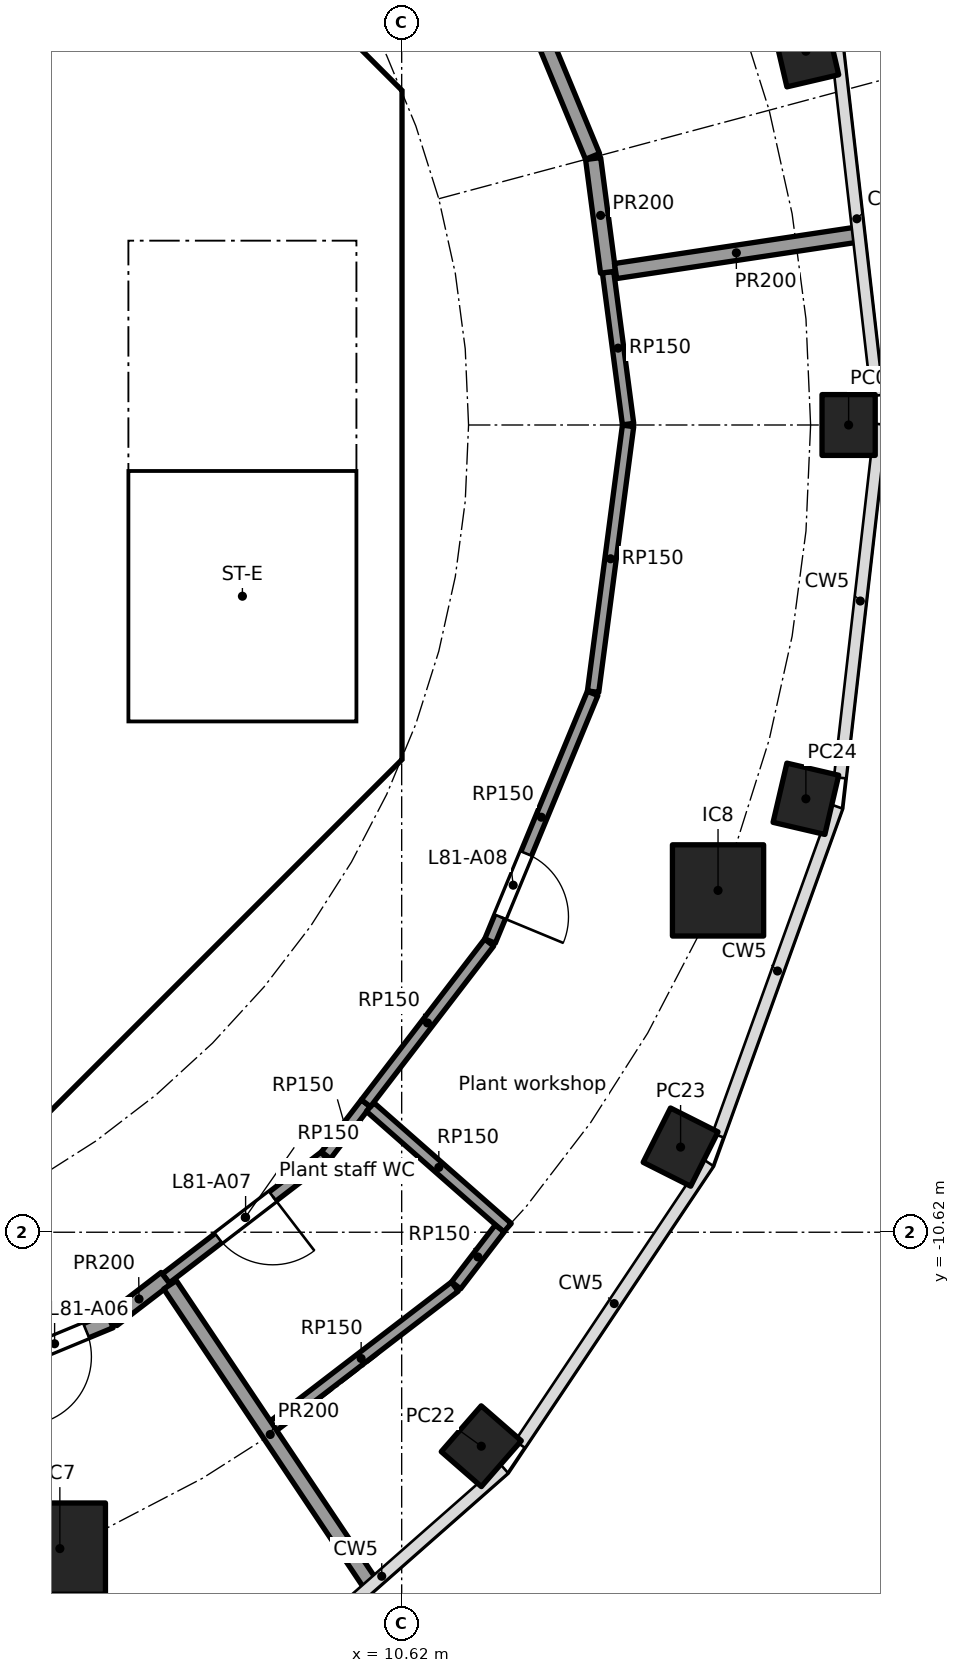
"""IFC4 building model, lengths in metres.
Left out: names, types, materials, properties, quantities, classifications, styles, units other than length and angle.
Written with IfcOpenShell. Run it as: python <this file> out.ifc"""

import sys

from ifc_helpers import new_model, si_unit, direction, frame, frame_2d, origin, origin_2d, place, context, subcontext, project, spatial, polyline, rectangle, hollow_rectangle, outline, extrude, element, fill, save


model = new_model("IFC4")
c1 = context("Model", 3, precision=1e-05, world=origin(), true_north=direction((0.0, 1.0)))
c2 = subcontext(c1, "Body", "Model", "MODEL_VIEW")
j1 = project(units=[si_unit("LENGTHUNIT", "METRE"), si_unit("PLANEANGLEUNIT", "RADIAN")], contexts=[c1])
p1 = place(None, origin())
s1 = spatial("IfcSite", under=j1, at=p1, CompositionType="ELEMENT")
p2 = place(p1, origin())
s2 = spatial("IfcBuilding", under=s1, at=p2, CompositionType="ELEMENT")
p3 = place(p2, frame((0.0, 0.0, 328.9)))
s3 = spatial("IfcBuildingStorey", under=s2, at=p3, CompositionType="ELEMENT", Elevation=328.9)
for number, where, z_axis, x_axis in (
    (1, (16.5, 0.0, 0.0), (0.0, 0.0, 1.0), (0.0, 1.0, 0.0)),
    (2, (15.938, 4.917, 0.0), (0.0, 0.0, 1.0), (-0.227, 0.974, 0.0)),
    (3, (11.667, -13.435, 0.0), (0.0, 0.0, 1.0), (0.657, 0.754, 0.0)),
    (4, (14.289, -9.5, 0.0), (0.0, 0.0, 1.0), (0.45, 0.893, 0.0)),
    (5, (15.938, -4.917, 0.0), (0.0, 0.0, 1.0), (0.227, 0.974, 0.0)),
):
    element("IfcColumn", number, at=place(p3, frame(where, z_axis=z_axis, x_axis=x_axis)), inside=s3, PredefinedType="COLUMN", context=c2, shape_type="SweptSolid", body=[
        extrude(hollow_rectangle(XDim=0.8, YDim=0.7, WallThickness=0.025, at=origin_2d()), origin(), (0.0, 0.0, 1.0), 4.0),
    ])
for number, where, z_axis, x_axis in (
    (6, (6.123, -14.782, 0.0), (0.0, 0.0, 1.0), (1.0, 0.0, 0.0)),
    (7, (14.782, -6.123, 0.0), (0.0, 0.0, 1.0), (1.0, 0.0, 0.0)),
):
    element("IfcColumn", number, at=place(p3, frame(where, z_axis=z_axis, x_axis=x_axis)), inside=s3, PredefinedType="COLUMN", context=c2, shape_type="SweptSolid", body=[
        extrude(rectangle(XDim=1.2, YDim=1.2, at=origin_2d()), origin(), (0.0, 0.0, 1.0), 4.0),
    ])
p4 = place(p3, frame((9.988, 4.613, 0.0), z_axis=(0.0, 0.0, 1.0), x_axis=(-0.707106781187, 0.707106781187, 0.0)))
e8 = element("IfcWall", 8, at=p4, inside=s3, PredefinedType="SHEAR", context=c2, shape_type="SweptSolid", body=[
    extrude(rectangle(XDim=7.602, YDim=0.6, at=frame_2d((3.801, 0.0))), origin(), (0.0, 0.0, 1.0), 3.7),
])
p5 = place(p4, frame((3.201, 0.0, 0.0)))
e9 = element("IfcOpeningElement", 9, at=p5, cuts=e8, PredefinedType="OPENING", context=c2, shape_type="SweptSolid", body=[
    extrude(rectangle(XDim=1.2, YDim=2.1, at=frame_2d((0.6, 1.05))), frame((0.0, 0.31, 0.0), z_axis=(0.0, -1.0, 0.0), x_axis=(1.0, 0.0, 0.0)), (0.0, 0.0, 1.0), 0.62),
])
p6 = place(p3, frame((4.613, -9.988, 0.0), z_axis=(0.0, 0.0, 1.0), x_axis=(0.707106781187, 0.707106781187, 0.0)))
e10 = element("IfcWall", 10, at=p6, inside=s3, PredefinedType="SHEAR", context=c2, shape_type="SweptSolid", body=[
    extrude(rectangle(XDim=7.602, YDim=0.6, at=frame_2d((3.801, 0.0))), origin(), (0.0, 0.0, 1.0), 3.7),
])
p7 = place(p6, frame((3.201, 0.0, 0.0)))
e11 = element("IfcOpeningElement", 11, at=p7, cuts=e10, PredefinedType="OPENING", context=c2, shape_type="SweptSolid", body=[
    extrude(rectangle(XDim=1.2, YDim=2.1, at=frame_2d((0.6, 1.05))), frame((0.0, 0.31, 0.0), z_axis=(0.0, -1.0, 0.0), x_axis=(1.0, 0.0, 0.0)), (0.0, 0.0, 1.0), 0.62),
])
p8 = place(p3, frame((-6.7, 2.0, 0.0), z_axis=(0.0, 0.0, 1.0), x_axis=(1.0, 0.0, 0.0)))
e12 = element("IfcWall", 12, at=p8, inside=s3, PredefinedType="SOLIDWALL", context=c2, shape_type="SweptSolid", body=[
    extrude(rectangle(XDim=13.4, YDim=0.2, at=frame_2d((6.7, 0.0))), origin(), (0.0, 0.0, 1.0), 3.7),
])
p9 = place(p8, frame((1.85, 0.0, 0.0)))
e13 = element("IfcOpeningElement", 13, at=p9, cuts=e12, PredefinedType="OPENING", context=c2, shape_type="SweptSolid", body=[
    extrude(rectangle(XDim=0.9, YDim=2.1, at=frame_2d((0.45, 1.05))), frame((0.0, 0.11, 0.0), z_axis=(0.0, -1.0, 0.0), x_axis=(1.0, 0.0, 0.0)), (0.0, 0.0, 1.0), 0.22),
])
p10 = place(p8, frame((5.15, 0.0, 0.0)))
e14 = element("IfcOpeningElement", 14, at=p10, cuts=e12, PredefinedType="OPENING", context=c2, shape_type="SweptSolid", body=[
    extrude(rectangle(XDim=0.9, YDim=2.1, at=frame_2d((0.45, 1.05))), frame((0.0, 0.11, 0.0), z_axis=(0.0, -1.0, 0.0), x_axis=(1.0, 0.0, 0.0)), (0.0, 0.0, 1.0), 0.22),
])
p11 = place(p8, frame((8.45, 0.0, 0.0)))
e15 = element("IfcOpeningElement", 15, at=p11, cuts=e12, PredefinedType="OPENING", context=c2, shape_type="SweptSolid", body=[
    extrude(rectangle(XDim=0.9, YDim=2.1, at=frame_2d((0.45, 1.05))), frame((0.0, 0.11, 0.0), z_axis=(0.0, -1.0, 0.0), x_axis=(1.0, 0.0, 0.0)), (0.0, 0.0, 1.0), 0.22),
])
p12 = place(p8, frame((11.75, 0.0, 0.0)))
e16 = element("IfcOpeningElement", 16, at=p12, cuts=e12, PredefinedType="OPENING", context=c2, shape_type="SweptSolid", body=[
    extrude(rectangle(XDim=0.9, YDim=2.1, at=frame_2d((0.45, 1.05))), frame((0.0, 0.11, 0.0), z_axis=(0.0, -1.0, 0.0), x_axis=(1.0, 0.0, 0.0)), (0.0, 0.0, 1.0), 0.22),
])
p13 = place(p3, frame((6.7, 4.0, 0.0), z_axis=(0.0, 0.0, 1.0), x_axis=(1.0, 0.0, 0.0)))
e17 = element("IfcWall", 17, at=p13, inside=s3, PredefinedType="SOLIDWALL", context=c2, shape_type="SweptSolid", body=[
    extrude(rectangle(XDim=3.325, YDim=0.2, at=frame_2d((1.662, 0.0))), origin(), (0.0, 0.0, 1.0), 3.7),
])
p14 = place(p13, frame((1.25, 0.0, 0.0)))
e18 = element("IfcOpeningElement", 18, at=p14, cuts=e17, PredefinedType="OPENING", context=c2, shape_type="SweptSolid", body=[
    extrude(rectangle(XDim=1.1, YDim=2.1, at=frame_2d((0.55, 1.05))), frame((0.0, 0.11, 0.0), z_axis=(0.0, -1.0, 0.0), x_axis=(1.0, 0.0, 0.0)), (0.0, 0.0, 1.0), 0.22),
])
p15 = place(p3, frame((-6.7, -2.0, 0.0), z_axis=(0.0, 0.0, 1.0), x_axis=(1.0, 0.0, 0.0)))
e19 = element("IfcWall", 19, at=p15, inside=s3, PredefinedType="SOLIDWALL", context=c2, shape_type="SweptSolid", body=[
    extrude(rectangle(XDim=13.4, YDim=0.2, at=frame_2d((6.7, 0.0))), origin(), (0.0, 0.0, 1.0), 3.7),
])
p16 = place(p15, frame((1.85, 0.0, 0.0)))
e20 = element("IfcOpeningElement", 20, at=p16, cuts=e19, PredefinedType="OPENING", context=c2, shape_type="SweptSolid", body=[
    extrude(rectangle(XDim=0.9, YDim=2.1, at=frame_2d((0.45, 1.05))), frame((0.0, 0.11, 0.0), z_axis=(0.0, -1.0, 0.0), x_axis=(1.0, 0.0, 0.0)), (0.0, 0.0, 1.0), 0.22),
])
p17 = place(p15, frame((5.15, 0.0, 0.0)))
e21 = element("IfcOpeningElement", 21, at=p17, cuts=e19, PredefinedType="OPENING", context=c2, shape_type="SweptSolid", body=[
    extrude(rectangle(XDim=0.9, YDim=2.1, at=frame_2d((0.45, 1.05))), frame((0.0, 0.11, 0.0), z_axis=(0.0, -1.0, 0.0), x_axis=(1.0, 0.0, 0.0)), (0.0, 0.0, 1.0), 0.22),
])
p18 = place(p15, frame((7.35, 0.0, 0.0)))
e22 = element("IfcOpeningElement", 22, at=p18, cuts=e19, PredefinedType="OPENING", context=c2, shape_type="SweptSolid", body=[
    extrude(rectangle(XDim=0.9, YDim=2.1, at=frame_2d((0.45, 1.05))), frame((0.0, 0.11, 0.0), z_axis=(0.0, -1.0, 0.0), x_axis=(1.0, 0.0, 0.0)), (0.0, 0.0, 1.0), 0.22),
])
p19 = place(p15, frame((10.65, 0.0, 0.0)))
e23 = element("IfcOpeningElement", 23, at=p19, cuts=e19, PredefinedType="OPENING", context=c2, shape_type="SweptSolid", body=[
    extrude(rectangle(XDim=0.9, YDim=2.1, at=frame_2d((0.45, 1.05))), frame((0.0, 0.11, 0.0), z_axis=(0.0, -1.0, 0.0), x_axis=(1.0, 0.0, 0.0)), (0.0, 0.0, 1.0), 0.22),
])
p20 = place(p3, origin())
e24 = element("IfcWall", 24, at=p20, inside=s3, PredefinedType="SHEAR", context=c2, shape_type="SweptSolid", body=[
    extrude(outline(polyline([(9.776, -4.401), (10.025, -4.152), (10.025, -3.801), (10.025, 4.152), (9.776, 4.401), (10.2, 4.825), (10.625, 4.401), (10.625, -4.401), (10.2, -4.825), (9.776, -4.401)])), origin(), (0.0, 0.0, 1.0), 3.7),
])
p21 = place(p3, origin())
e25 = element("IfcWall", 25, at=p21, inside=s3, PredefinedType="SOLIDWALL", context=c2, shape_type="SweptSolid", body=[
    extrude(outline(polyline([(-6.7, -2.1), (-6.5, -2.1), (-6.5, -4.1), (-2.3, -4.1), (-2.3, -2.1), (-2.1, -2.1), (-2.1, -4.1), (-0.1, -4.1), (-0.1, -2.1), (0.1, -2.1), (0.1, -4.1), (2.1, -4.1), (2.1, -2.1), (2.3, -2.1), (2.3, -4.1), (6.5, -4.1), (6.5, -2.1), (6.7, -2.1), (6.7, -4.3), (-6.7, -4.3), (-6.7, -2.1)])), origin(), (0.0, 0.0, 1.0), 3.7),
])
p22 = place(p3, origin())
e26 = element("IfcWall", 26, at=p22, inside=s3, PredefinedType="SOLIDWALL", context=c2, shape_type="SweptSolid", body=[
    extrude(outline(polyline([(-6.7, 4.3), (6.7, 4.3), (6.7, 2.1), (6.5, 2.1), (6.5, 4.1), (4.5, 4.1), (4.5, 2.1), (4.3, 2.1), (4.3, 4.1), (0.1, 4.1), (0.1, 2.1), (-0.1, 2.1), (-0.1, 4.1), (-2.1, 4.1), (-2.1, 2.1), (-2.3, 2.1), (-2.3, 4.1), (-6.5, 4.1), (-6.5, 2.1), (-6.7, 2.1), (-6.7, 4.3)])), origin(), (0.0, 0.0, 1.0), 3.7),
])
p23 = place(p3, origin())
e27 = element("IfcWall", 27, at=p23, inside=s3, PredefinedType="SOLIDWALL", context=c2, shape_type="SweptSolid", body=[
    extrude(outline(polyline([(7.025, -3.9), (6.7, -3.9), (6.7, 3.9), (7.025, 3.9), (7.025, -3.9)])), origin(), (0.0, 0.0, 1.0), 3.7),
])
p24 = place(p3, origin())
e28 = element("IfcWall", 28, at=p24, inside=s3, PredefinedType="SOLIDWALL", context=c2, shape_type="SweptSolid", body=[
    extrude(outline(polyline([(10.025, -4.1), (6.7, -4.1), (6.7, -3.9), (10.025, -3.9), (10.025, -4.1)])), origin(), (0.0, 0.0, 1.0), 3.7),
])
p25 = place(p3, frame((9.607, -9.624, 0.0), z_axis=(0.0, 0.0, 1.0), x_axis=(-0.793381127635, -0.608725214126, 0.0)))
e29 = element("IfcWall", 29, at=p25, inside=s3, PredefinedType="PARTITIONING", context=c2, shape_type="SweptSolid", body=[
    extrude(rectangle(XDim=2.635, YDim=0.15, at=frame_2d((1.317, 0.0))), origin(), (0.0, 0.0, 1.0), 3.7),
])
p26 = place(p25, frame((0.862, 0.0, 0.0)))
e30 = element("IfcOpeningElement", 30, at=p26, cuts=e29, PredefinedType="OPENING", context=c2, shape_type="SweptSolid", body=[
    extrude(rectangle(XDim=0.9, YDim=2.1, at=frame_2d((0.45, 1.05))), frame((0.0, 0.085, 0.0), z_axis=(0.0, -1.0, 0.0), x_axis=(1.0, 0.0, 0.0)), (0.0, 0.0, 1.0), 0.17),
])
p27 = place(p3, frame((10.149, -8.923, 0.0), z_axis=(0.0, 0.0, 1.0), x_axis=(-0.608752479135, -0.793360207691, 0.0)))
e31 = element("IfcWall", 31, at=p27, inside=s3, PredefinedType="PARTITIONING", context=c2, shape_type="SweptSolid", body=[
    extrude(rectangle(XDim=0.862, YDim=0.15, at=frame_2d((0.431, 0.0))), origin(), (0.0, 0.0, 1.0), 3.7),
])
p28 = place(p3, frame((10.205, -8.973, 0.0), z_axis=(0.0, 0.0, 1.0), x_axis=(0.750971181711, -0.66033497881, 0.0)))
e32 = element("IfcWall", 32, at=p28, inside=s3, PredefinedType="PARTITIONING", context=c2, shape_type="SweptSolid", body=[
    extrude(rectangle(XDim=2.406, YDim=0.15, at=frame_2d((1.203, 0.0))), origin(), (0.0, 0.0, 1.0), 3.7),
])
p29 = place(p3, frame((11.319, -11.336, 0.0), z_axis=(0.0, 0.0, 1.0), x_axis=(-0.793397594576, -0.608703751361, 0.0)))
e33 = element("IfcWall", 33, at=p29, inside=s3, PredefinedType="PARTITIONING", context=c2, shape_type="SweptSolid", body=[
    extrude(rectangle(XDim=3.106, YDim=0.15, at=frame_2d((1.553, 0.0))), origin(), (0.0, 0.0, 1.0), 3.7),
])
p30 = place(p3, frame((11.771, -6.809, 0.0), z_axis=(0.0, 0.0, 1.0), x_axis=(-0.608731606531, -0.793376222993, 0.0)))
e34 = element("IfcWall", 34, at=p30, inside=s3, PredefinedType="PARTITIONING", context=c2, shape_type="SweptSolid", body=[
    extrude(rectangle(XDim=2.664, YDim=0.15, at=frame_2d((1.332, 0.0))), origin(), (0.0, 0.0, 1.0), 3.7),
])
p31 = place(p3, frame((11.909, -10.571, 0.0), z_axis=(0.0, 0.0, 1.0), x_axis=(-0.608583762221, -0.793489637211, 0.0)))
e35 = element("IfcWall", 35, at=p31, inside=s3, PredefinedType="PARTITIONING", context=c2, shape_type="SweptSolid", body=[
    extrude(rectangle(XDim=0.943, YDim=0.15, at=frame_2d((0.471, 0.0))), origin(), (0.0, 0.0, 1.0), 3.7),
])
p32 = place(p3, frame((13.132, -3.531, 0.0), z_axis=(0.0, 0.0, 1.0), x_axis=(-0.382677866108, -0.923881838111, 0.0)))
e36 = element("IfcWall", 36, at=p32, inside=s3, PredefinedType="PARTITIONING", context=c2, shape_type="SweptSolid", body=[
    extrude(rectangle(XDim=3.527, YDim=0.15, at=frame_2d((1.763, 0.0))), origin(), (0.0, 0.0, 1.0), 3.7),
])
p33 = place(p32, frame((2.281, 0.0, 0.0)))
e37 = element("IfcOpeningElement", 37, at=p33, cuts=e36, PredefinedType="OPENING", context=c2, shape_type="SweptSolid", body=[
    extrude(rectangle(XDim=0.9, YDim=2.1, at=frame_2d((0.45, 1.05))), frame((0.0, 0.085, 0.0), z_axis=(0.0, -1.0, 0.0), x_axis=(1.0, 0.0, 0.0)), (0.0, 0.0, 1.0), 0.17),
])
p34 = place(p3, frame((13.335, 2.01, 0.0), z_axis=(0.0, 0.0, 1.0), x_axis=(0.130545357325, -0.991442338051, 0.0)))
e38 = element("IfcWall", 38, at=p34, inside=s3, PredefinedType="PARTITIONING", context=c2, shape_type="SweptSolid", body=[
    extrude(rectangle(XDim=2.016, YDim=0.15, at=frame_2d((1.008, 0.0))), origin(), (0.0, 0.0, 1.0), 3.7),
])
p35 = place(p3, frame((13.598, -0.012, 0.0), z_axis=(0.0, 0.0, 1.0), x_axis=(-0.130499283623, -0.991448403586, 0.0)))
e39 = element("IfcWall", 39, at=p35, inside=s3, PredefinedType="PARTITIONING", context=c2, shape_type="SweptSolid", body=[
    extrude(rectangle(XDim=3.527, YDim=0.15, at=frame_2d((1.763, 0.0))), origin(), (0.0, 0.0, 1.0), 3.7),
])
p36 = place(p3, frame((6.786, -11.784, 0.0), z_axis=(0.0, 0.0, 1.0), x_axis=(-0.92386297064, -0.382723413813, 0.0)))
e40 = element("IfcWall", 40, at=p36, inside=s3, PredefinedType="PARTITIONING", context=c2, shape_type="SweptSolid", body=[
    extrude(rectangle(XDim=3.52, YDim=0.2, at=frame_2d((1.76, 0.0))), origin(), (0.0, 0.0, 1.0), 3.7),
])
p37 = place(p36, frame((0.342, 0.0, 0.0)))
e41 = element("IfcOpeningElement", 41, at=p37, cuts=e40, PredefinedType="OPENING", context=c2, shape_type="SweptSolid", body=[
    extrude(rectangle(XDim=0.9, YDim=2.1, at=frame_2d((0.45, 1.05))), frame((0.0, 0.11, 0.0), z_axis=(0.0, -1.0, 0.0), x_axis=(1.0, 0.0, 0.0)), (0.0, 0.0, 1.0), 0.22),
])
p38 = place(p3, frame((7.517, -11.228, 0.0), z_axis=(0.0, 0.0, 1.0), x_axis=(-0.793420478802, -0.608673922407, 0.0)))
e42 = element("IfcWall", 42, at=p38, inside=s3, PredefinedType="PARTITIONING", context=c2, shape_type="SweptSolid", body=[
    extrude(rectangle(XDim=0.888, YDim=0.2, at=frame_2d((0.444, 0.0))), origin(), (0.0, 0.0, 1.0), 3.7),
])
p39 = place(p3, frame((10.209, -15.25, 0.0), z_axis=(0.0, 0.0, 1.0), x_axis=(-0.55629198168, 0.830986901893, 0.0)))
e43 = element("IfcWall", 43, at=p39, inside=s3, PredefinedType="PARTITIONING", context=c2, shape_type="SweptSolid", body=[
    extrude(rectangle(XDim=4.74, YDim=0.2, at=frame_2d((2.37, 0.0))), origin(), (0.0, 0.0, 1.0), 3.7),
])
p40 = place(p3, frame((11.784, 6.786, 0.0), z_axis=(0.0, 0.0, 1.0), x_axis=(0.382723413813, -0.92386297064, 0.0)))
e44 = element("IfcWall", 44, at=p40, inside=s3, PredefinedType="PARTITIONING", context=c2, shape_type="SweptSolid", body=[
    extrude(rectangle(XDim=3.52, YDim=0.2, at=frame_2d((1.76, 0.0))), origin(), (0.0, 0.0, 1.0), 3.7),
])
p41 = place(p3, frame((13.139, 3.505, 0.0), z_axis=(0.0, 0.0, 1.0), x_axis=(0.130391662061, -0.99146256332, 0.0)))
e45 = element("IfcWall", 45, at=p41, inside=s3, PredefinedType="PARTITIONING", context=c2, shape_type="SweptSolid", body=[
    extrude(rectangle(XDim=1.507, YDim=0.2, at=frame_2d((0.754, 0.0))), origin(), (0.0, 0.0, 1.0), 3.7),
])
p42 = place(p3, frame((13.434, 2.025, 0.0), z_axis=(0.0, 0.0, 1.0), x_axis=(0.988817905908, 0.149127961685, 0.0)))
e46 = element("IfcWall", 46, at=p42, inside=s3, PredefinedType="PARTITIONING", context=c2, shape_type="SweptSolid", body=[
    extrude(rectangle(XDim=3.214, YDim=0.2, at=frame_2d((1.607, 0.0))), origin(), (0.0, 0.0, 1.0), 3.7),
])
p43 = place(p14, frame((1.1, 0.0, 0.0), x_axis=(-1.0, 0.0, 0.0)))
e47 = element("IfcDoor", 47, at=p43, inside=s3, OperationType="SINGLE_SWING_RIGHT", PredefinedType="DOOR", context=c2, shape_type="SweptSolid", body=[
    extrude(rectangle(XDim=1.1, YDim=2.1, at=frame_2d((0.55, 1.05))), frame((0.0, 0.025, 0.0), z_axis=(0.0, -1.0, 0.0), x_axis=(1.0, 0.0, 0.0)), (0.0, 0.0, 1.0), 0.05),
])
fill(e18, e47)
p44 = place(p7, origin())
e48 = element("IfcDoor", 48, at=p44, inside=s3, OperationType="SINGLE_SWING_LEFT", PredefinedType="DOOR", context=c2, shape_type="SweptSolid", body=[
    extrude(rectangle(XDim=1.2, YDim=2.1, at=frame_2d((0.6, 1.05))), frame((0.0, 0.025, 0.0), z_axis=(0.0, -1.0, 0.0), x_axis=(1.0, 0.0, 0.0)), (0.0, 0.0, 1.0), 0.05),
])
fill(e11, e48)
p45 = place(p37, origin())
e49 = element("IfcDoor", 49, at=p45, inside=s3, OperationType="SINGLE_SWING_RIGHT", PredefinedType="DOOR", context=c2, shape_type="SweptSolid", body=[
    extrude(rectangle(XDim=0.9, YDim=2.1, at=frame_2d((0.45, 1.05))), frame((0.0, 0.025, 0.0), z_axis=(0.0, -1.0, 0.0), x_axis=(1.0, 0.0, 0.0)), (0.0, 0.0, 1.0), 0.05),
])
fill(e41, e49)
p46 = place(p26, origin())
e50 = element("IfcDoor", 50, at=p46, inside=s3, OperationType="SINGLE_SWING_LEFT", PredefinedType="DOOR", context=c2, shape_type="SweptSolid", body=[
    extrude(rectangle(XDim=0.9, YDim=2.1, at=frame_2d((0.45, 1.05))), frame((0.0, 0.025, 0.0), z_axis=(0.0, -1.0, 0.0), x_axis=(1.0, 0.0, 0.0)), (0.0, 0.0, 1.0), 0.05),
])
fill(e30, e50)
p47 = place(p33, origin())
e51 = element("IfcDoor", 51, at=p47, inside=s3, OperationType="SINGLE_SWING_RIGHT", PredefinedType="DOOR", context=c2, shape_type="SweptSolid", body=[
    extrude(rectangle(XDim=0.9, YDim=2.1, at=frame_2d((0.45, 1.05))), frame((0.0, 0.025, 0.0), z_axis=(0.0, -1.0, 0.0), x_axis=(1.0, 0.0, 0.0)), (0.0, 0.0, 1.0), 0.05),
])
fill(e37, e51)
save(model, sys.argv[1])
